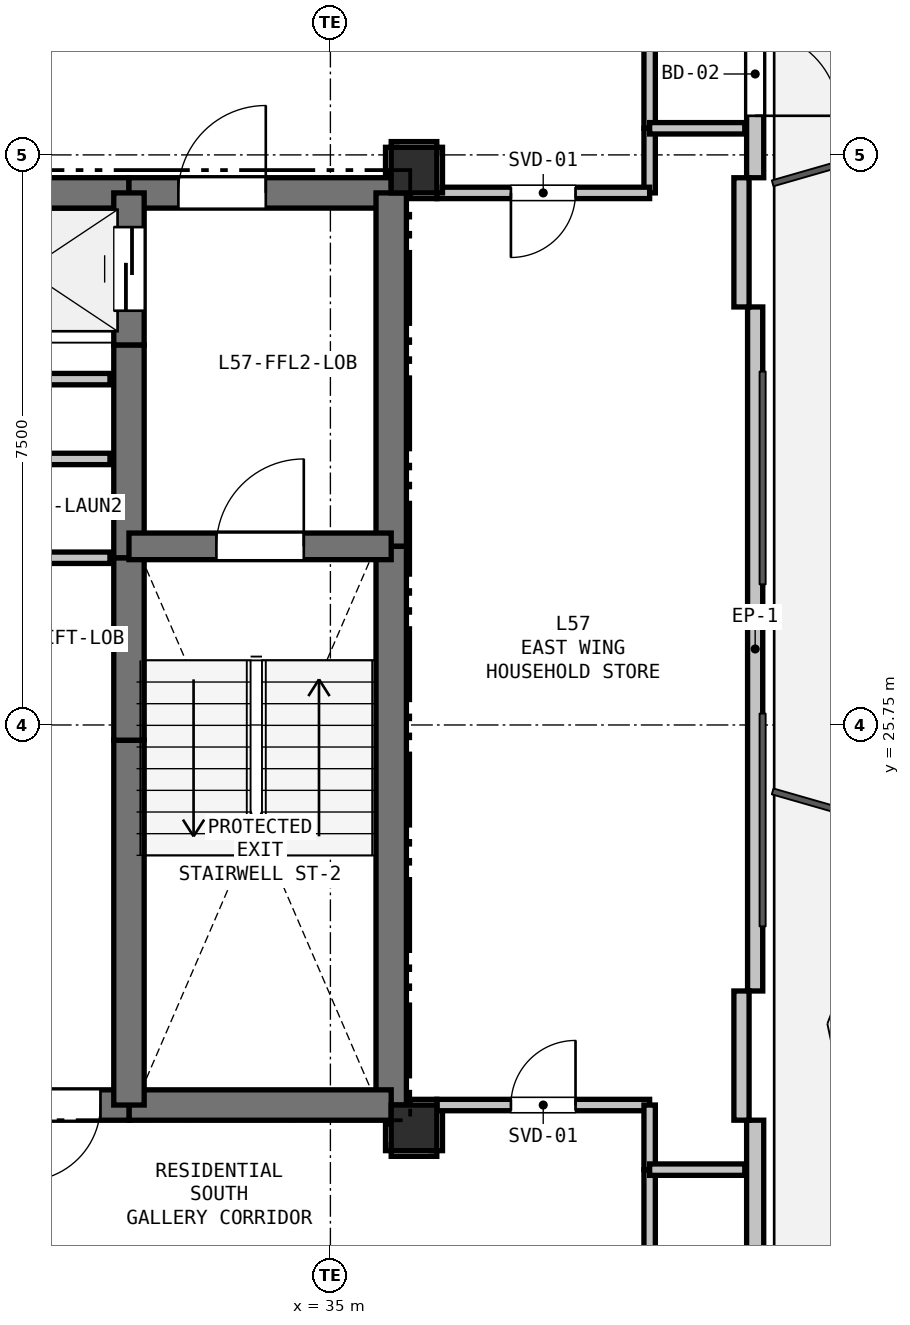
"""IFC4 building model, lengths in metres.
Left out: names, types, materials, properties, quantities, classifications, styles, units other than length and angle.
Written with IfcOpenShell. Run it as: python <this file> out.ifc"""

import sys

from ifc_helpers import new_model, si_unit, direction, frame, frame_2d, origin, origin_2d, place, context, subcontext, project, spatial, rectangle, extrude, element, fill, save


model = new_model("IFC4")
c1 = context("Model", 3, precision=1e-05, world=origin(), true_north=direction((0.0, 1.0)))
c2 = subcontext(c1, "Body", "Model", "MODEL_VIEW")
j1 = project(units=[si_unit("LENGTHUNIT", "METRE"), si_unit("PLANEANGLEUNIT", "RADIAN")], contexts=[c1])
p1 = place(None, origin())
s1 = spatial("IfcSite", under=j1, at=p1, CompositionType="ELEMENT")
p2 = place(p1, origin())
s2 = spatial("IfcBuilding", under=s1, at=p2, CompositionType="ELEMENT")
p3 = place(p2, frame((0.0, 0.0, 205.2)))
s3 = spatial("IfcBuildingStorey", under=s2, at=p3, CompositionType="ELEMENT", Elevation=205.2)
for number, where, z_axis, x_axis in (
    (1, (36.1, 33.05, 0.0), (0.0, 0.0, 1.0), (1.0, 0.0, 0.0)),
    (2, (36.1, 20.45, 0.0), (0.0, 0.0, 1.0), (1.0, 0.0, 0.0)),
):
    element("IfcColumn", number, at=place(p3, frame(where, z_axis=z_axis, x_axis=x_axis)), inside=s3, PredefinedType="COLUMN", context=c2, shape_type="SweptSolid", body=[
        extrude(rectangle(XDim=0.6, YDim=0.6, at=origin_2d()), origin(), (0.0, 0.0, 1.0), 3.3),
    ])
p4 = place(p3, frame((40.588, 42.648, 0.0), z_axis=(0.0, 0.0, 1.0), x_axis=(0.0, -1.0, 0.0)))
e3 = element("IfcWall", 3, at=p4, inside=s3, PredefinedType="SOLIDWALL", context=c2, shape_type="SweptSolid", body=[
    extrude(rectangle(XDim=9.699, YDim=0.225, at=frame_2d((4.85, 0.0))), origin(), (0.0, 0.0, 1.0), 2.69),
])
p5 = place(p4, frame((7.784, 0.0, 0.0)))
e4 = element("IfcOpeningElement", 4, at=p5, cuts=e3, PredefinedType="OPENING", context=c2, shape_type="SweptSolid", body=[
    extrude(rectangle(XDim=1.1, YDim=2.1, at=frame_2d((0.55, 1.05))), frame((0.0, 0.123, 0.0), z_axis=(0.0, -1.0, 0.0), x_axis=(1.0, 0.0, 0.0)), (0.0, 0.0, 1.0), 0.245),
])
p6 = place(p4, frame((5.252, 0.0, 0.9)))
e5 = element("IfcOpeningElement", 5, at=p6, cuts=e3, PredefinedType="OPENING", context=c2, shape_type="SweptSolid", body=[
    extrude(rectangle(XDim=1.2, YDim=1.4, at=frame_2d((0.6, 0.7))), frame((0.0, 0.123, 0.0), z_axis=(0.0, -1.0, 0.0), x_axis=(1.0, 0.0, 0.0)), (0.0, 0.0, 1.0), 0.245),
])
p7 = place(p3, frame((40.588, 31.25, 0.0), z_axis=(0.0, 0.0, 1.0), x_axis=(0.0, -1.0, 0.0)))
e6 = element("IfcWall", 6, at=p7, inside=s3, PredefinedType="PARAPET", context=c2, shape_type="SweptSolid", body=[
    extrude(rectangle(XDim=8.999, YDim=0.2, at=frame_2d((4.5, 0.0))), origin(), (0.0, 0.0, 1.0), 0.2),
])
p8 = place(p3, frame((40.588, 20.551, 0.0), z_axis=(0.0, 0.0, 1.0), x_axis=(0.0, -1.0, 0.0)))
e7 = element("IfcWall", 7, at=p8, inside=s3, PredefinedType="SOLIDWALL", context=c2, shape_type="SweptSolid", body=[
    extrude(rectangle(XDim=9.699, YDim=0.225, at=frame_2d((4.85, 0.0))), origin(), (0.0, 0.0, 1.0), 2.69),
])
p9 = place(p8, frame((7.735, 0.0, 0.9)))
e8 = element("IfcOpeningElement", 8, at=p9, cuts=e7, PredefinedType="OPENING", context=c2, shape_type="SweptSolid", body=[
    extrude(rectangle(XDim=1.2, YDim=1.4, at=frame_2d((0.6, 0.7))), frame((0.0, 0.123, 0.0), z_axis=(0.0, -1.0, 0.0), x_axis=(1.0, 0.0, 0.0)), (0.0, 0.0, 1.0), 0.245),
])
for number, where, z_axis, x_axis in (
    (9, (40.408, 32.949, 0.0), (0.0, 0.0, 1.0), (0.0, -1.0, 0.0)),
    (10, (40.408, 22.25, 0.0), (0.0, 0.0, 1.0), (0.0, -1.0, 0.0)),
):
    element("IfcWall", number, at=place(p3, frame(where, z_axis=z_axis, x_axis=x_axis)), inside=s3, PredefinedType="PARAPET", context=c2, shape_type="SweptSolid", body=[
        extrude(rectangle(XDim=1.7, YDim=0.2, at=frame_2d((0.85, 0.0))), origin(), (0.0, 0.0, 1.0), 2.69),
    ])
p10 = place(p3, frame((29.65, 32.75, 0.0), z_axis=(0.0, 0.0, 1.0), x_axis=(1.0, 0.0, 0.0)))
e11 = element("IfcWall", 11, at=p10, inside=s3, PredefinedType="SHEAR", context=c2, shape_type="SweptSolid", body=[
    extrude(rectangle(XDim=2.7, YDim=0.4, at=frame_2d((1.35, 0.0))), origin(), (0.0, 0.0, 1.0), 3.07),
])
p11 = place(p3, frame((32.35, 32.75, 0.0), z_axis=(0.0, 0.0, 1.0), x_axis=(1.0, 0.0, 0.0)))
e12 = element("IfcWall", 12, at=p11, inside=s3, PredefinedType="SHEAR", context=c2, shape_type="SweptSolid", body=[
    extrude(rectangle(XDim=3.45, YDim=0.4, at=frame_2d((1.725, 0.0))), origin(), (0.0, 0.0, 1.0), 3.07),
])
p12 = place(p11, frame((0.65, 0.0, 0.0)))
e13 = element("IfcOpeningElement", 13, at=p12, cuts=e12, PredefinedType="OPENING", context=c2, shape_type="SweptSolid", body=[
    extrude(rectangle(XDim=1.15, YDim=2.15, at=frame_2d((0.575, 1.075))), frame((0.0, 0.21, 0.0), z_axis=(0.0, -1.0, 0.0), x_axis=(1.0, 0.0, 0.0)), (0.0, 0.0, 1.0), 0.42),
])
p13 = place(p3, frame((35.8, 32.75, 0.0), z_axis=(0.0, 0.0, 1.0), x_axis=(0.0, -1.0, 0.0)))
e14 = element("IfcWall", 14, at=p13, inside=s3, PredefinedType="SHEAR", context=c2, shape_type="SweptSolid", body=[
    extrude(rectangle(XDim=4.65, YDim=0.4, at=frame_2d((2.325, 0.0))), origin(), (0.0, 0.0, 1.0), 3.07),
])
p14 = place(p3, frame((35.8, 28.1, 0.0), z_axis=(0.0, 0.0, 1.0), x_axis=(0.0, -1.0, 0.0)))
e15 = element("IfcWall", 15, at=p14, inside=s3, PredefinedType="SHEAR", context=c2, shape_type="SweptSolid", body=[
    extrude(rectangle(XDim=7.35, YDim=0.4, at=frame_2d((3.675, 0.0))), origin(), (0.0, 0.0, 1.0), 3.07),
])
p15 = place(p3, frame((35.8, 20.75, 0.0), z_axis=(0.0, 0.0, 1.0), x_axis=(-1.0, 0.0, 0.0)))
e16 = element("IfcWall", 16, at=p15, inside=s3, PredefinedType="SHEAR", context=c2, shape_type="SweptSolid", body=[
    extrude(rectangle(XDim=3.45, YDim=0.4, at=frame_2d((1.725, 0.0))), origin(), (0.0, 0.0, 1.0), 3.07),
])
p16 = place(p3, frame((32.35, 20.75, 0.0), z_axis=(0.0, 0.0, 1.0), x_axis=(-1.0, 0.0, 0.0)))
e17 = element("IfcWall", 17, at=p16, inside=s3, PredefinedType="SHEAR", context=c2, shape_type="SweptSolid", body=[
    extrude(rectangle(XDim=1.75, YDim=0.4, at=frame_2d((0.875, 0.0))), origin(), (0.0, 0.0, 1.0), 3.07),
])
p17 = place(p16, frame((0.375, 0.0, 0.0)))
e18 = element("IfcOpeningElement", 18, at=p17, cuts=e17, PredefinedType="OPENING", context=c2, shape_type="SweptSolid", body=[
    extrude(rectangle(XDim=1.0, YDim=2.15, at=frame_2d((0.5, 1.075))), frame((0.0, 0.21, 0.0), z_axis=(0.0, -1.0, 0.0), x_axis=(1.0, 0.0, 0.0)), (0.0, 0.0, 1.0), 0.42),
])
p18 = place(p3, frame((32.35, 20.75, 0.0), z_axis=(0.0, 0.0, 1.0), x_axis=(0.0, 1.0, 0.0)))
e19 = element("IfcWall", 19, at=p18, inside=s3, PredefinedType="SHEAR", context=c2, shape_type="SweptSolid", body=[
    extrude(rectangle(XDim=4.8, YDim=0.4, at=frame_2d((2.4, 0.0))), origin(), (0.0, 0.0, 1.0), 3.07),
])
p19 = place(p3, frame((32.35, 25.55, 0.0), z_axis=(0.0, 0.0, 1.0), x_axis=(0.0, 1.0, 0.0)))
e20 = element("IfcWall", 20, at=p19, inside=s3, PredefinedType="SHEAR", context=c2, shape_type="SweptSolid", body=[
    extrude(rectangle(XDim=2.4, YDim=0.4, at=frame_2d((1.2, 0.0))), origin(), (0.0, 0.0, 1.0), 3.07),
])
p20 = place(p3, frame((32.35, 27.95, 0.0), z_axis=(0.0, 0.0, 1.0), x_axis=(0.0, 1.0, 0.0)))
e21 = element("IfcWall", 21, at=p20, inside=s3, PredefinedType="SHEAR", context=c2, shape_type="SweptSolid", body=[
    extrude(rectangle(XDim=2.8, YDim=0.4, at=frame_2d((1.4, 0.0))), origin(), (0.0, 0.0, 1.0), 3.07),
])
p21 = place(p3, frame((32.35, 30.75, 0.0), z_axis=(0.0, 0.0, 1.0), x_axis=(0.0, 1.0, 0.0)))
e22 = element("IfcWall", 22, at=p21, inside=s3, PredefinedType="SHEAR", context=c2, shape_type="SweptSolid", body=[
    extrude(rectangle(XDim=2.0, YDim=0.4, at=frame_2d((1.0, 0.0))), origin(), (0.0, 0.0, 1.0), 3.07),
])
p22 = place(p21, frame((0.45, 0.0, 0.0)))
e23 = element("IfcOpeningElement", 23, at=p22, cuts=e22, PredefinedType="OPENING", context=c2, shape_type="SweptSolid", body=[
    extrude(rectangle(XDim=1.1, YDim=2.15, at=frame_2d((0.55, 1.075))), frame((0.0, 0.21, 0.0), z_axis=(0.0, -1.0, 0.0), x_axis=(1.0, 0.0, 0.0)), (0.0, 0.0, 1.0), 0.42),
])
p23 = place(p3, frame((32.35, 28.1, 0.0), z_axis=(0.0, 0.0, 1.0), x_axis=(1.0, 0.0, 0.0)))
e24 = element("IfcWall", 24, at=p23, inside=s3, PredefinedType="SHEAR", context=c2, shape_type="SweptSolid", body=[
    extrude(rectangle(XDim=3.45, YDim=0.35, at=frame_2d((1.725, 0.0))), origin(), (0.0, 0.0, 1.0), 3.07),
])
p24 = place(p23, frame((1.15, 0.0, 0.0)))
e25 = element("IfcOpeningElement", 25, at=p24, cuts=e24, PredefinedType="OPENING", context=c2, shape_type="SweptSolid", body=[
    extrude(rectangle(XDim=1.15, YDim=2.15, at=frame_2d((0.575, 1.075))), frame((0.0, 0.185, 0.0), z_axis=(0.0, -1.0, 0.0), x_axis=(1.0, 0.0, 0.0)), (0.0, 0.0, 1.0), 0.37),
])
p25 = place(p3, frame((32.1, 30.3, 0.0), z_axis=(0.0, 0.0, 1.0), x_axis=(-1.0, 0.0, 0.0)))
e26 = element("IfcWall", 26, at=p25, inside=s3, PredefinedType="PARTITIONING", context=c2, shape_type="SweptSolid", body=[
    extrude(rectangle(XDim=2.45, YDim=0.15, at=frame_2d((1.225, 0.0))), origin(), (0.0, 0.0, 1.0), 3.07),
])
p26 = place(p3, frame((27.4, 27.95, 0.0), z_axis=(0.0, 0.0, 1.0), x_axis=(1.0, 0.0, 0.0)))
e27 = element("IfcWall", 27, at=p26, inside=s3, PredefinedType="PARTITIONING", context=c2, shape_type="SweptSolid", body=[
    extrude(rectangle(XDim=4.7, YDim=0.15, at=frame_2d((2.35, 0.0))), origin(), (0.0, 0.0, 1.0), 3.07),
])
p27 = place(p26, frame((1.85, 0.0, 0.0)))
e28 = element("IfcOpeningElement", 28, at=p27, cuts=e27, PredefinedType="OPENING", context=c2, shape_type="SweptSolid", body=[
    extrude(rectangle(XDim=1.0, YDim=2.15, at=frame_2d((0.5, 1.075))), frame((0.0, 0.085, 0.0), z_axis=(0.0, -1.0, 0.0), x_axis=(1.0, 0.0, 0.0)), (0.0, 0.0, 1.0), 0.17),
])
p28 = place(p3, frame((39.2, 35.2, 0.0), z_axis=(0.0, 0.0, 1.0), x_axis=(0.0, -1.0, 0.0)))
e29 = element("IfcWall", 29, at=p28, inside=s3, PredefinedType="PARTITIONING", context=c2, shape_type="SweptSolid", body=[
    extrude(rectangle(XDim=1.6, YDim=0.15, at=frame_2d((0.8, 0.0))), origin(), (0.0, 0.0, 1.0), 3.07),
])
p29 = place(p3, frame((39.2, 33.6, 0.0), z_axis=(0.0, 0.0, 1.0), x_axis=(0.0, -1.0, 0.0)))
e30 = element("IfcWall", 30, at=p29, inside=s3, PredefinedType="PARTITIONING", context=c2, shape_type="SweptSolid", body=[
    extrude(rectangle(XDim=0.85, YDim=0.15, at=frame_2d((0.425, 0.0))), origin(), (0.0, 0.0, 1.0), 3.07),
])
p30 = place(p3, frame((39.2, 32.75, 0.0), z_axis=(0.0, 0.0, 1.0), x_axis=(-1.0, 0.0, 0.0)))
e31 = element("IfcWall", 31, at=p30, inside=s3, PredefinedType="PARTITIONING", context=c2, shape_type="SweptSolid", body=[
    extrude(rectangle(XDim=2.8, YDim=0.15, at=frame_2d((1.4, 0.0))), origin(), (0.0, 0.0, 1.0), 3.07),
])
p31 = place(p30, frame((0.975, 0.0, 0.0)))
e32 = element("IfcOpeningElement", 32, at=p31, cuts=e31, PredefinedType="OPENING", context=c2, shape_type="SweptSolid", body=[
    extrude(rectangle(XDim=0.85, YDim=2.1, at=frame_2d((0.425, 1.05))), frame((0.0, 0.085, 0.0), z_axis=(0.0, -1.0, 0.0), x_axis=(1.0, 0.0, 0.0)), (0.0, 0.0, 1.0), 0.17),
])
p32 = place(p3, frame((36.4, 32.75, 0.0), z_axis=(0.0, 0.0, 1.0), x_axis=(0.0, 1.0, 0.0)))
e33 = element("IfcWall", 33, at=p32, inside=s3, PredefinedType="PARTITIONING", context=c2, shape_type="SweptSolid", body=[
    extrude(rectangle(XDim=0.6, YDim=0.15, at=frame_2d((0.3, 0.0))), origin(), (0.0, 0.0, 1.0), 2.518),
])
p33 = place(p3, frame((36.4, 33.35, 0.0), z_axis=(0.0, 0.0, 1.0), x_axis=(-1.0, 0.0, 0.0)))
e34 = element("IfcWall", 34, at=p33, inside=s3, PredefinedType="PARTITIONING", context=c2, shape_type="SweptSolid", body=[
    extrude(rectangle(XDim=0.6, YDim=0.15, at=frame_2d((0.3, 0.0))), origin(), (0.0, 0.0, 1.0), 2.518),
])
for number, where, z_axis, x_axis in (
    (35, (35.8, 33.35, 0.0), (0.0, 0.0, 1.0), (0.0, -1.0, 0.0)),
    (36, (35.8, 20.5, 0.0), (0.0, 0.0, 1.0), (0.0, -1.0, 0.0)),
):
    element("IfcWall", number, at=place(p3, frame(where, z_axis=z_axis, x_axis=x_axis)), inside=s3, PredefinedType="PARTITIONING", context=c2, shape_type="SweptSolid", body=[
        extrude(rectangle(XDim=0.35, YDim=0.15, at=frame_2d((0.175, 0.0))), origin(), (0.0, 0.0, 1.0), 2.595),
    ])
p34 = place(p3, frame((35.8, 20.15, 0.0), z_axis=(0.0, 0.0, 1.0), x_axis=(1.0, 0.0, 0.0)))
e37 = element("IfcWall", 37, at=p34, inside=s3, PredefinedType="PARTITIONING", context=c2, shape_type="SweptSolid", body=[
    extrude(rectangle(XDim=0.6, YDim=0.15, at=frame_2d((0.3, 0.0))), origin(), (0.0, 0.0, 1.0), 2.518),
])
p35 = place(p3, frame((36.4, 20.15, 0.0), z_axis=(0.0, 0.0, 1.0), x_axis=(0.0, 1.0, 0.0)))
e38 = element("IfcWall", 38, at=p35, inside=s3, PredefinedType="PARTITIONING", context=c2, shape_type="SweptSolid", body=[
    extrude(rectangle(XDim=0.6, YDim=0.15, at=frame_2d((0.3, 0.0))), origin(), (0.0, 0.0, 1.0), 2.518),
])
p36 = place(p3, frame((36.4, 20.75, 0.0), z_axis=(0.0, 0.0, 1.0), x_axis=(1.0, 0.0, 0.0)))
e39 = element("IfcWall", 39, at=p36, inside=s3, PredefinedType="PARTITIONING", context=c2, shape_type="SweptSolid", body=[
    extrude(rectangle(XDim=2.8, YDim=0.15, at=frame_2d((1.4, 0.0))), origin(), (0.0, 0.0, 1.0), 3.07),
])
p37 = place(p36, frame((0.975, 0.0, 0.0)))
e40 = element("IfcOpeningElement", 40, at=p37, cuts=e39, PredefinedType="OPENING", context=c2, shape_type="SweptSolid", body=[
    extrude(rectangle(XDim=0.85, YDim=2.1, at=frame_2d((0.425, 1.05))), frame((0.0, 0.085, 0.0), z_axis=(0.0, -1.0, 0.0), x_axis=(1.0, 0.0, 0.0)), (0.0, 0.0, 1.0), 0.17),
])
p38 = place(p3, frame((39.2, 20.75, 0.0), z_axis=(0.0, 0.0, 1.0), x_axis=(0.0, -1.0, 0.0)))
e41 = element("IfcWall", 41, at=p38, inside=s3, PredefinedType="PARTITIONING", context=c2, shape_type="SweptSolid", body=[
    extrude(rectangle(XDim=0.85, YDim=0.15, at=frame_2d((0.425, 0.0))), origin(), (0.0, 0.0, 1.0), 3.07),
])
p39 = place(p3, frame((39.2, 19.9, 0.0), z_axis=(0.0, 0.0, 1.0), x_axis=(0.0, -1.0, 0.0)))
e42 = element("IfcWall", 42, at=p39, inside=s3, PredefinedType="PARTITIONING", context=c2, shape_type="SweptSolid", body=[
    extrude(rectangle(XDim=1.6, YDim=0.15, at=frame_2d((0.8, 0.0))), origin(), (0.0, 0.0, 1.0), 3.07),
])
p40 = place(p3, frame((32.1, 29.25, 0.0), z_axis=(0.0, 0.0, 1.0), x_axis=(-1.0, 0.0, 0.0)))
e43 = element("IfcWall", 43, at=p40, inside=s3, PredefinedType="PARTITIONING", context=c2, shape_type="SweptSolid", body=[
    extrude(rectangle(XDim=4.7, YDim=0.15, at=frame_2d((2.35, 0.0))), origin(), (0.0, 0.0, 1.0), 3.07),
])
for number, where, z_axis, x_axis in (
    (44, (36.4, 20.75, 0.0), (0.0, 0.0, 1.0), (-1.0, 0.0, 0.0)),
    (45, (36.05, 32.75, 0.0), (0.0, 0.0, 1.0), (1.0, 0.0, 0.0)),
):
    element("IfcWall", number, at=place(p3, frame(where, z_axis=z_axis, x_axis=x_axis)), inside=s3, PredefinedType="PARTITIONING", context=c2, shape_type="SweptSolid", body=[
        extrude(rectangle(XDim=0.35, YDim=0.15, at=frame_2d((0.175, 0.0))), origin(), (0.0, 0.0, 1.0), 2.595),
    ])
for number, where, z_axis, x_axis in (
    (46, (39.2, 33.6, 0.0), (0.0, 0.0, 1.0), (1.0, 0.0, 0.0)),
    (47, (40.452, 19.9, 0.0), (0.0, 0.0, 1.0), (-1.0, 0.0, 0.0)),
):
    element("IfcWall", number, at=place(p3, frame(where, z_axis=z_axis, x_axis=x_axis)), inside=s3, PredefinedType="PARTITIONING", context=c2, shape_type="SweptSolid", body=[
        extrude(rectangle(XDim=1.252, YDim=0.15, at=frame_2d((0.626, 0.0))), origin(), (0.0, 0.0, 1.0), 2.365),
    ])
p41 = place(p5, origin())
e48 = element("IfcDoor", 48, at=p41, inside=s3, OperationType="SINGLE_SWING_RIGHT", PredefinedType="DOOR", context=c2, shape_type="SweptSolid", body=[
    extrude(rectangle(XDim=1.1, YDim=2.1, at=frame_2d((0.55, 1.05))), frame((0.0, 0.025, 0.0), z_axis=(0.0, -1.0, 0.0), x_axis=(1.0, 0.0, 0.0)), (0.0, 0.0, 1.0), 0.05),
])
fill(e4, e48)
p42 = place(p17, origin())
e49 = element("IfcDoor", 49, at=p42, inside=s3, OperationType="SINGLE_SWING_RIGHT", PredefinedType="DOOR", context=c2, shape_type="SweptSolid", body=[
    extrude(rectangle(XDim=1.0, YDim=2.15, at=frame_2d((0.5, 1.075))), frame((0.0, 0.025, 0.0), z_axis=(0.0, -1.0, 0.0), x_axis=(1.0, 0.0, 0.0)), (0.0, 0.0, 1.0), 0.05),
])
fill(e18, e49)
p43 = place(p22, origin())
e50 = element("IfcDoor", 50, at=p43, inside=s3, OperationType="SLIDING_TO_LEFT", PredefinedType="DOOR", context=c2, shape_type="SweptSolid", body=[
    extrude(rectangle(XDim=1.1, YDim=2.15, at=frame_2d((0.55, 1.075))), frame((0.0, 0.025, 0.0), z_axis=(0.0, -1.0, 0.0), x_axis=(1.0, 0.0, 0.0)), (0.0, 0.0, 1.0), 0.05),
])
fill(e23, e50)
p44 = place(p24, origin())
e51 = element("IfcDoor", 51, at=p44, inside=s3, OperationType="SINGLE_SWING_RIGHT", PredefinedType="DOOR", context=c2, shape_type="SweptSolid", body=[
    extrude(rectangle(XDim=1.15, YDim=2.15, at=frame_2d((0.575, 1.075))), frame((0.0, 0.025, 0.0), z_axis=(0.0, -1.0, 0.0), x_axis=(1.0, 0.0, 0.0)), (0.0, 0.0, 1.0), 0.05),
])
fill(e25, e51)
p45 = place(p12, origin())
e52 = element("IfcDoor", 52, at=p45, inside=s3, OperationType="SINGLE_SWING_RIGHT", PredefinedType="DOOR", context=c2, shape_type="SweptSolid", body=[
    extrude(rectangle(XDim=1.15, YDim=2.15, at=frame_2d((0.575, 1.075))), frame((0.0, 0.025, 0.0), z_axis=(0.0, -1.0, 0.0), x_axis=(1.0, 0.0, 0.0)), (0.0, 0.0, 1.0), 0.05),
])
fill(e13, e52)
p46 = place(p31, origin())
e53 = element("IfcDoor", 53, at=p46, inside=s3, OperationType="SINGLE_SWING_RIGHT", PredefinedType="DOOR", context=c2, shape_type="SweptSolid", body=[
    extrude(rectangle(XDim=0.85, YDim=2.1, at=frame_2d((0.425, 1.05))), frame((0.0, 0.025, 0.0), z_axis=(0.0, -1.0, 0.0), x_axis=(1.0, 0.0, 0.0)), (0.0, 0.0, 1.0), 0.05),
])
fill(e32, e53)
p47 = place(p37, origin())
e54 = element("IfcDoor", 54, at=p47, inside=s3, OperationType="SINGLE_SWING_RIGHT", PredefinedType="DOOR", context=c2, shape_type="SweptSolid", body=[
    extrude(rectangle(XDim=0.85, YDim=2.1, at=frame_2d((0.425, 1.05))), frame((0.0, 0.025, 0.0), z_axis=(0.0, -1.0, 0.0), x_axis=(1.0, 0.0, 0.0)), (0.0, 0.0, 1.0), 0.05),
])
fill(e40, e54)
save(model, sys.argv[1])
